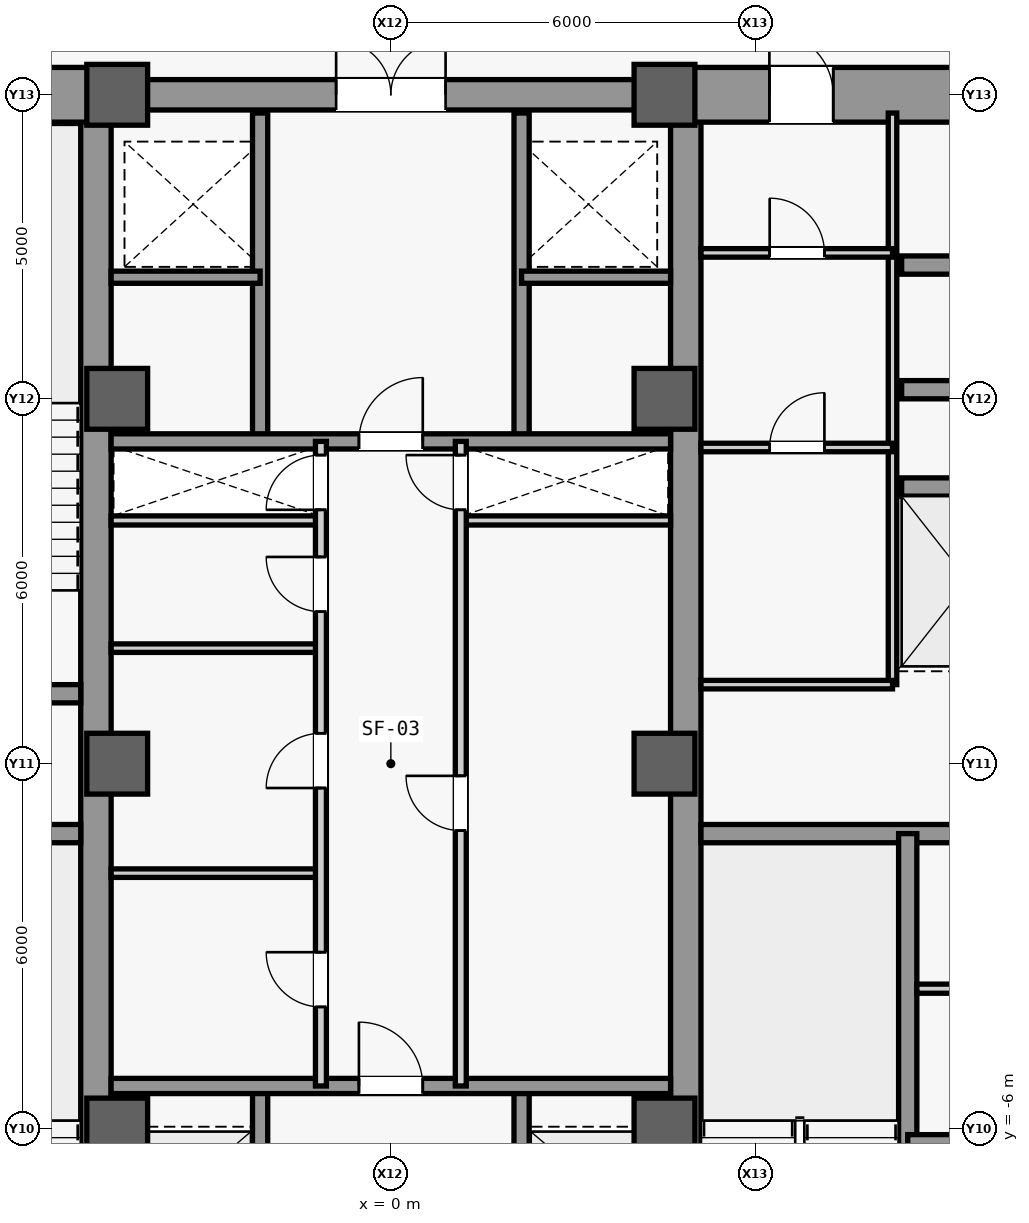
"""IFC4 building model, lengths in metres.
Left out: names, types, materials, properties, quantities, classifications, styles, units other than length and angle.
Written with IfcOpenShell. Run it as: python <this file> out.ifc"""

import sys

from ifc_helpers import new_model, si_unit, direction, frame, frame_2d, origin, origin_2d, place, context, subcontext, project, spatial, rectangle, extrude, source, transform, mapped, element, fill, save


model = new_model("IFC4")
c1 = context("Model", 3, precision=1e-05, world=origin(), true_north=direction((0.0, 1.0)))
c2 = subcontext(c1, "Body", "Model", "MODEL_VIEW")
j1 = project(units=[si_unit("LENGTHUNIT", "METRE"), si_unit("PLANEANGLEUNIT", "RADIAN")], contexts=[c1])
p1 = place(None, origin())
s1 = spatial("IfcSite", under=j1, at=p1, CompositionType="ELEMENT")
p2 = place(p1, origin())
s2 = spatial("IfcBuilding", under=s1, at=p2, CompositionType="ELEMENT")
p3 = place(p2, frame((0.0, 0.0, 83.0)))
s3 = spatial("IfcBuildingStorey", under=s2, at=p3, CompositionType="ELEMENT", Elevation=83.0)
m1 = source(origin(), c2, "Body", "SweptSolid", [
    extrude(rectangle(XDim=21.4, YDim=0.5, at=frame_2d((10.7, 0.0))), origin(), (0.0, 0.0, 1.0), 3.94),
])
for number, where, z_axis, x_axis in (
    (1, (-4.85, -10.7, 0.0), (0.0, 0.0, 1.0), (0.0, 1.0, 0.0)),
    (2, (4.85, -10.7, 0.0), (0.0, 0.0, 1.0), (0.0, 1.0, 0.0)),
):
    element("IfcWall", number, at=place(p3, frame(where, z_axis=z_axis, x_axis=x_axis)), inside=s3, PredefinedType="SHEAR", context=c2, shape_type="MappedRepresentation", body=[
        mapped(m1, transform((0.0, 0.0, 0.0), scale=1.0)),
    ])
m2 = source(origin(), c2, "Body", "SweptSolid", [
    extrude(rectangle(XDim=5.85, YDim=0.9, at=frame_2d((2.925, 0.0))), origin(), (0.0, 0.0, 1.0), 3.94),
])
p4 = place(p3, frame((-10.7, 11.0, 0.0), z_axis=(0.0, 0.0, 1.0), x_axis=(1.0, 0.0, 0.0)))
e3 = element("IfcWall", 3, at=p4, inside=s3, PredefinedType="SHEAR", context=c2, shape_type="MappedRepresentation", body=[
    mapped(m2, transform((0.0, 0.0, 0.0), scale=1.0)),
])
p5 = place(p3, frame((4.85, 11.0, 0.0), z_axis=(0.0, 0.0, 1.0), x_axis=(1.0, 0.0, 0.0)))
e4 = element("IfcWall", 4, at=p5, inside=s3, PredefinedType="SHEAR", context=c2, shape_type="MappedRepresentation", body=[
    mapped(m2, transform((0.0, 0.0, 0.0), scale=1.0)),
])
m3 = source(origin(), c2, "Body", "SweptSolid", [
    extrude(rectangle(XDim=1.05, YDim=2.2, at=frame_2d((0.525, 1.1))), frame((0.0, 0.46, 0.0), z_axis=(0.0, -1.0, 0.0), x_axis=(1.0, 0.0, 0.0)), (0.0, 0.0, 1.0), 0.92),
])
p6 = place(p5, frame((1.375, 0.0, 0.0)))
e5 = element("IfcOpeningElement", 5, at=p6, cuts=e4, PredefinedType="OPENING", context=c2, shape_type="MappedRepresentation", body=[
    mapped(m3, transform((0.0, 0.0, 0.0), scale=1.0)),
])
m4 = source(origin(), c2, "Body", "SweptSolid", [
    extrude(rectangle(XDim=5.6, YDim=0.3, at=frame_2d((2.8, 0.0))), origin(), (0.0, 0.0, 1.0), 3.94),
])
for number, where, z_axis, x_axis in (
    (6, (-10.7, -1.15, 0.0), (0.0, 0.0, 1.0), (1.0, 0.0, 0.0)),
    (7, (-10.7, 1.15, 0.0), (0.0, 0.0, 1.0), (1.0, 0.0, 0.0)),
    (8, (5.1, -1.15, 0.0), (0.0, 0.0, 1.0), (1.0, 0.0, 0.0)),
):
    element("IfcWall", number, at=place(p3, frame(where, z_axis=z_axis, x_axis=x_axis)), inside=s3, PredefinedType="SHEAR", context=c2, shape_type="MappedRepresentation", body=[
        mapped(m4, transform((0.0, 0.0, 0.0), scale=1.0)),
    ])
m5 = source(origin(), c2, "Body", "SweptSolid", [
    extrude(rectangle(XDim=9.2, YDim=0.5, at=frame_2d((4.6, 0.0))), origin(), (0.0, 0.0, 1.0), 3.94),
])
p7 = place(p3, frame((-4.6, 11.0, 0.0), z_axis=(0.0, 0.0, 1.0), x_axis=(1.0, 0.0, 0.0)))
e9 = element("IfcWall", 9, at=p7, inside=s3, PredefinedType="SHEAR", context=c2, shape_type="MappedRepresentation", body=[
    mapped(m5, transform((0.0, 0.0, 0.0), scale=1.0)),
])
m6 = source(origin(), c2, "Body", "SweptSolid", [
    extrude(rectangle(XDim=1.8, YDim=2.25, at=frame_2d((0.9, 1.125))), frame((0.0, 0.26, 0.0), z_axis=(0.0, -1.0, 0.0), x_axis=(1.0, 0.0, 0.0)), (0.0, 0.0, 1.0), 0.52),
])
p8 = place(p7, frame((3.7, 0.0, 0.0)))
e10 = element("IfcOpeningElement", 10, at=p8, cuts=e9, PredefinedType="OPENING", context=c2, shape_type="MappedRepresentation", body=[
    mapped(m6, transform((0.0, 0.0, 0.0), scale=1.0)),
])
m7 = source(origin(), c2, "Body", "SweptSolid", [
    extrude(rectangle(XDim=1.0, YDim=1.0, at=origin_2d()), origin(), (0.0, 0.0, 1.0), 4.2),
])
for number, where, z_axis, x_axis in (
    (11, (-4.5, -6.0, 0.0), (0.0, 0.0, 1.0), (1.0, 0.0, 0.0)),
    (12, (-4.5, 0.0, 0.0), (0.0, 0.0, 1.0), (1.0, 0.0, 0.0)),
    (13, (-4.5, 6.0, 0.0), (0.0, 0.0, 1.0), (1.0, 0.0, 0.0)),
    (14, (-4.5, 11.0, 0.0), (0.0, 0.0, 1.0), (1.0, 0.0, 0.0)),
    (15, (4.5, -6.0, 0.0), (0.0, 0.0, 1.0), (1.0, 0.0, 0.0)),
    (16, (4.5, 0.0, 0.0), (0.0, 0.0, 1.0), (1.0, 0.0, 0.0)),
    (17, (4.5, 6.0, 0.0), (0.0, 0.0, 1.0), (1.0, 0.0, 0.0)),
    (18, (4.5, 11.0, 0.0), (0.0, 0.0, 1.0), (1.0, 0.0, 0.0)),
):
    element("IfcColumn", number, at=place(p3, frame(where, z_axis=z_axis, x_axis=x_axis)), inside=s3, PredefinedType="COLUMN", context=c2, shape_type="MappedRepresentation", body=[
        mapped(m7, transform((0.0, 0.0, 0.0), scale=1.0)),
    ])
m8 = source(origin(), c2, "Body", "SweptSolid", [
    extrude(rectangle(XDim=7.8, YDim=0.3, at=frame_2d((3.9, 0.0))), origin(), (0.0, 0.0, 1.0), 3.94),
])
p9 = place(p3, frame((8.5, -8.95, 0.0), z_axis=(0.0, 0.0, 1.0), x_axis=(0.0, 1.0, 0.0)))
e19 = element("IfcWall", 19, at=p9, inside=s3, PredefinedType="SHEAR", context=c2, shape_type="MappedRepresentation", body=[
    mapped(m8, transform((0.0, 0.0, 0.0), scale=1.0)),
])
m9 = source(origin(), c2, "Body", "SweptSolid", [
    extrude(rectangle(XDim=2.2, YDim=0.3, at=frame_2d((1.1, 0.0))), origin(), (0.0, 0.0, 1.0), 3.94),
])
p10 = place(p3, frame((8.5, -6.25, 0.0), z_axis=(0.0, 0.0, 1.0), x_axis=(1.0, 0.0, 0.0)))
e20 = element("IfcWall", 20, at=p10, inside=s3, PredefinedType="SHEAR", context=c2, shape_type="MappedRepresentation", body=[
    mapped(m9, transform((0.0, 0.0, 0.0), scale=1.0)),
])
m10 = source(origin(), c2, "Body", "SweptSolid", [
    extrude(rectangle(XDim=2.3, YDim=0.3, at=frame_2d((1.15, 0.0))), origin(), (0.0, 0.0, 1.0), 3.94),
])
for number, where, z_axis, x_axis in (
    (21, (8.4, 4.55, 0.0), (0.0, 0.0, 1.0), (1.0, 0.0, 0.0)),
    (22, (8.4, 6.15, 0.0), (0.0, 0.0, 1.0), (1.0, 0.0, 0.0)),
    (23, (8.4, 8.2, 0.0), (0.0, 0.0, 1.0), (1.0, 0.0, 0.0)),
):
    element("IfcWall", number, at=place(p3, frame(where, z_axis=z_axis, x_axis=x_axis)), inside=s3, PredefinedType="SHEAR", context=c2, shape_type="MappedRepresentation", body=[
        mapped(m10, transform((0.0, 0.0, 0.0), scale=1.0)),
    ])
m11 = source(origin(), c2, "Body", "SweptSolid", [
    extrude(rectangle(XDim=2.05, YDim=0.15, at=frame_2d((1.025, 0.0))), origin(), (0.0, 0.0, 1.0), 3.94),
])
p11 = place(p3, frame((8.65, -3.7, 0.0), z_axis=(0.0, 0.0, 1.0), x_axis=(1.0, 0.0, 0.0)))
e24 = element("IfcWall", 24, at=p11, inside=s3, PredefinedType="PARTITIONING", context=c2, shape_type="MappedRepresentation", body=[
    mapped(m11, transform((0.0, 0.0, 0.0), scale=1.0)),
])
m12 = source(origin(), c2, "Body", "SweptSolid", [
    extrude(rectangle(XDim=9.4, YDim=0.14, at=frame_2d((4.7, 0.0))), origin(), (0.0, 0.0, 1.0), 3.94),
])
p12 = place(p3, frame((8.25, 1.3, 0.0), z_axis=(0.0, 0.0, 1.0), x_axis=(0.0, 1.0, 0.0)))
e25 = element("IfcWall", 25, at=p12, inside=s3, PredefinedType="PARTITIONING", context=c2, shape_type="MappedRepresentation", body=[
    mapped(m12, transform((0.0, 0.0, 0.0), scale=1.0)),
])
m13 = source(origin(), c2, "Body", "SweptSolid", [
    extrude(rectangle(XDim=3.15, YDim=0.14, at=frame_2d((1.575, 0.0))), origin(), (0.0, 0.0, 1.0), 3.94),
])
p13 = place(p3, frame((5.1, 1.3, 0.0), z_axis=(0.0, 0.0, 1.0), x_axis=(1.0, 0.0, 0.0)))
e26 = element("IfcWall", 26, at=p13, inside=s3, PredefinedType="PARTITIONING", context=c2, shape_type="MappedRepresentation", body=[
    mapped(m13, transform((0.0, 0.0, 0.0), scale=1.0)),
])
p14 = place(p3, frame((5.1, 8.4, 0.0), z_axis=(0.0, 0.0, 1.0), x_axis=(1.0, 0.0, 0.0)))
e27 = element("IfcWall", 27, at=p14, inside=s3, PredefinedType="PARTITIONING", context=c2, shape_type="MappedRepresentation", body=[
    mapped(m13, transform((0.0, 0.0, 0.0), scale=1.0)),
])
m14 = source(origin(), c2, "Body", "SweptSolid", [
    extrude(rectangle(XDim=0.9, YDim=2.15, at=frame_2d((0.45, 1.075))), frame((0.0, 0.08, 0.0), z_axis=(0.0, -1.0, 0.0), x_axis=(1.0, 0.0, 0.0)), (0.0, 0.0, 1.0), 0.16),
])
p15 = place(p14, frame((1.13, 0.0, 0.0)))
e28 = element("IfcOpeningElement", 28, at=p15, cuts=e27, PredefinedType="OPENING", context=c2, shape_type="MappedRepresentation", body=[
    mapped(m14, transform((0.0, 0.0, 0.0), scale=1.0)),
])
p16 = place(p3, frame((5.1, 5.2, 0.0), z_axis=(0.0, 0.0, 1.0), x_axis=(1.0, 0.0, 0.0)))
e29 = element("IfcWall", 29, at=p16, inside=s3, PredefinedType="PARTITIONING", context=c2, shape_type="MappedRepresentation", body=[
    mapped(m13, transform((0.0, 0.0, 0.0), scale=1.0)),
])
p17 = place(p16, frame((1.13, 0.0, 0.0)))
e30 = element("IfcOpeningElement", 30, at=p17, cuts=e29, PredefinedType="OPENING", context=c2, shape_type="MappedRepresentation", body=[
    mapped(m14, transform((0.0, 0.0, 0.0), scale=1.0)),
])
m15 = source(origin(), c2, "Body", "SweptSolid", [
    extrude(rectangle(XDim=3.45, YDim=0.15, at=frame_2d((1.725, 0.0))), origin(), (0.0, 0.0, 1.0), 3.94),
])
for number, where, z_axis, x_axis in (
    (31, (-4.6, 4.0, 0.0), (0.0, 0.0, 1.0), (1.0, 0.0, 0.0)),
    (32, (1.15, 4.0, 0.0), (0.0, 0.0, 1.0), (1.0, 0.0, 0.0)),
):
    element("IfcWall", number, at=place(p3, frame(where, z_axis=z_axis, x_axis=x_axis)), inside=s3, PredefinedType="PARTITIONING", context=c2, shape_type="MappedRepresentation", body=[
        mapped(m15, transform((0.0, 0.0, 0.0), scale=1.0)),
    ])
m16 = source(origin(), c2, "Body", "SweptSolid", [
    extrude(rectangle(XDim=5.4, YDim=0.25, at=frame_2d((2.7, 0.0))), origin(), (0.0, 0.0, 1.0), 3.94),
])
p18 = place(p3, frame((-2.15, -10.7, 0.0), z_axis=(0.0, 0.0, 1.0), x_axis=(0.0, 1.0, 0.0)))
e33 = element("IfcWall", 33, at=p18, inside=s3, PredefinedType="SHEAR", context=c2, shape_type="MappedRepresentation", body=[
    mapped(m16, transform((0.0, 0.0, 0.0), scale=1.0)),
])
m17 = source(origin(), c2, "Body", "SweptSolid", [
    extrude(rectangle(XDim=1.2, YDim=2.3, at=frame_2d((0.6, 1.15))), frame((0.0, 0.135, 0.0), z_axis=(0.0, -1.0, 0.0), x_axis=(1.0, 0.0, 0.0)), (0.0, 0.0, 1.0), 0.27),
])
p19 = place(p18, frame((0.9, 0.0, 0.0)))
e34 = element("IfcOpeningElement", 34, at=p19, cuts=e33, PredefinedType="OPENING", context=c2, shape_type="MappedRepresentation", body=[
    mapped(m17, transform((0.0, 0.0, 0.0), scale=1.0)),
])
p20 = place(p18, frame((3.2, 0.0, 0.0)))
e35 = element("IfcOpeningElement", 35, at=p20, cuts=e33, PredefinedType="OPENING", context=c2, shape_type="MappedRepresentation", body=[
    mapped(m17, transform((0.0, 0.0, 0.0), scale=1.0)),
])
p21 = place(p3, frame((2.15, -10.7, 0.0), z_axis=(0.0, 0.0, 1.0), x_axis=(0.0, 1.0, 0.0)))
e36 = element("IfcWall", 36, at=p21, inside=s3, PredefinedType="SHEAR", context=c2, shape_type="MappedRepresentation", body=[
    mapped(m16, transform((0.0, 0.0, 0.0), scale=1.0)),
])
p22 = place(p21, frame((0.9, 0.0, 0.0)))
e37 = element("IfcOpeningElement", 37, at=p22, cuts=e36, PredefinedType="OPENING", context=c2, shape_type="MappedRepresentation", body=[
    mapped(m17, transform((0.0, 0.0, 0.0), scale=1.0)),
])
p23 = place(p21, frame((3.2, 0.0, 0.0)))
e38 = element("IfcOpeningElement", 38, at=p23, cuts=e36, PredefinedType="OPENING", context=c2, shape_type="MappedRepresentation", body=[
    mapped(m17, transform((0.0, 0.0, 0.0), scale=1.0)),
])
m18 = source(origin(), c2, "Body", "SweptSolid", [
    extrude(rectangle(XDim=9.2, YDim=0.25, at=frame_2d((4.6, 0.0))), origin(), (0.0, 0.0, 1.0), 3.94),
])
p24 = place(p3, frame((-4.6, -5.3, 0.0), z_axis=(0.0, 0.0, 1.0), x_axis=(1.0, 0.0, 0.0)))
e39 = element("IfcWall", 39, at=p24, inside=s3, PredefinedType="SHEAR", context=c2, shape_type="MappedRepresentation", body=[
    mapped(m18, transform((0.0, 0.0, 0.0), scale=1.0)),
])
m19 = source(origin(), c2, "Body", "SweptSolid", [
    extrude(rectangle(XDim=1.05, YDim=2.2, at=frame_2d((0.525, 1.1))), frame((0.0, 0.135, 0.0), z_axis=(0.0, -1.0, 0.0), x_axis=(1.0, 0.0, 0.0)), (0.0, 0.0, 1.0), 0.27),
])
p25 = place(p24, frame((4.075, 0.0, 0.0)))
e40 = element("IfcOpeningElement", 40, at=p25, cuts=e39, PredefinedType="OPENING", context=c2, shape_type="MappedRepresentation", body=[
    mapped(m19, transform((0.0, 0.0, 0.0), scale=1.0)),
])
for number, where, z_axis, x_axis in (
    (41, (-2.15, 5.3, 0.0), (0.0, 0.0, 1.0), (0.0, 1.0, 0.0)),
    (42, (2.15, 5.3, 0.0), (0.0, 0.0, 1.0), (0.0, 1.0, 0.0)),
):
    element("IfcWall", number, at=place(p3, frame(where, z_axis=z_axis, x_axis=x_axis)), inside=s3, PredefinedType="SHEAR", context=c2, shape_type="MappedRepresentation", body=[
        mapped(m16, transform((0.0, 0.0, 0.0), scale=1.0)),
    ])
m20 = source(origin(), c2, "Body", "SweptSolid", [
    extrude(rectangle(XDim=2.45, YDim=0.2, at=frame_2d((1.225, 0.0))), origin(), (0.0, 0.0, 1.0), 3.94),
])
for number, where, z_axis, x_axis in (
    (43, (-4.6, 8.0, 0.0), (0.0, 0.0, 1.0), (1.0, 0.0, 0.0)),
    (44, (2.15, 8.0, 0.0), (0.0, 0.0, 1.0), (1.0, 0.0, 0.0)),
):
    element("IfcWall", number, at=place(p3, frame(where, z_axis=z_axis, x_axis=x_axis)), inside=s3, PredefinedType="SHEAR", context=c2, shape_type="MappedRepresentation", body=[
        mapped(m20, transform((0.0, 0.0, 0.0), scale=1.0)),
    ])
p26 = place(p3, frame((-4.6, 5.3, 0.0), z_axis=(0.0, 0.0, 1.0), x_axis=(1.0, 0.0, 0.0)))
e45 = element("IfcWall", 45, at=p26, inside=s3, PredefinedType="SHEAR", context=c2, shape_type="MappedRepresentation", body=[
    mapped(m18, transform((0.0, 0.0, 0.0), scale=1.0)),
])
p27 = place(p26, frame((4.075, 0.0, 0.0)))
e46 = element("IfcOpeningElement", 46, at=p27, cuts=e45, PredefinedType="OPENING", context=c2, shape_type="MappedRepresentation", body=[
    mapped(m19, transform((0.0, 0.0, 0.0), scale=1.0)),
])
m21 = source(origin(), c2, "Body", "SweptSolid", [
    extrude(rectangle(XDim=3.45, YDim=0.14, at=frame_2d((1.725, 0.0))), origin(), (0.0, 0.0, 1.0), 3.94),
])
for number, where, z_axis, x_axis in (
    (47, (-4.6, -1.8, 0.0), (0.0, 0.0, 1.0), (1.0, 0.0, 0.0)),
    (48, (-4.6, 1.9, 0.0), (0.0, 0.0, 1.0), (1.0, 0.0, 0.0)),
):
    element("IfcWall", number, at=place(p3, frame(where, z_axis=z_axis, x_axis=x_axis)), inside=s3, PredefinedType="PARTITIONING", context=c2, shape_type="MappedRepresentation", body=[
        mapped(m21, transform((0.0, 0.0, 0.0), scale=1.0)),
    ])
m22 = source(origin(), c2, "Body", "SweptSolid", [
    extrude(rectangle(XDim=10.6, YDim=0.18, at=frame_2d((5.3, 0.0))), origin(), (0.0, 0.0, 1.0), 3.94),
])
p28 = place(p3, frame((-1.15, -5.3, 0.0), z_axis=(0.0, 0.0, 1.0), x_axis=(0.0, 1.0, 0.0)))
e49 = element("IfcWall", 49, at=p28, inside=s3, PredefinedType="PARTITIONING", context=c2, shape_type="MappedRepresentation", body=[
    mapped(m22, transform((0.0, 0.0, 0.0), scale=1.0)),
])
m23 = source(origin(), c2, "Body", "SweptSolid", [
    extrude(rectangle(XDim=0.9, YDim=2.15, at=frame_2d((0.45, 1.075))), frame((0.0, 0.1, 0.0), z_axis=(0.0, -1.0, 0.0), x_axis=(1.0, 0.0, 0.0)), (0.0, 0.0, 1.0), 0.2),
])
p29 = place(p28, frame((1.3, 0.0, 0.0)))
e50 = element("IfcOpeningElement", 50, at=p29, cuts=e49, PredefinedType="OPENING", context=c2, shape_type="MappedRepresentation", body=[
    mapped(m23, transform((0.0, 0.0, 0.0), scale=1.0)),
])
p30 = place(p28, frame((4.9, 0.0, 0.0)))
e51 = element("IfcOpeningElement", 51, at=p30, cuts=e49, PredefinedType="OPENING", context=c2, shape_type="MappedRepresentation", body=[
    mapped(m23, transform((0.0, 0.0, 0.0), scale=1.0)),
])
p31 = place(p28, frame((7.8, 0.0, 0.0)))
e52 = element("IfcOpeningElement", 52, at=p31, cuts=e49, PredefinedType="OPENING", context=c2, shape_type="MappedRepresentation", body=[
    mapped(m23, transform((0.0, 0.0, 0.0), scale=1.0)),
])
p32 = place(p28, frame((9.475, 0.0, 0.0)))
e53 = element("IfcOpeningElement", 53, at=p32, cuts=e49, PredefinedType="OPENING", context=c2, shape_type="MappedRepresentation", body=[
    mapped(m23, transform((0.0, 0.0, 0.0), scale=1.0)),
])
p33 = place(p3, frame((1.15, -5.3, 0.0), z_axis=(0.0, 0.0, 1.0), x_axis=(0.0, 1.0, 0.0)))
e54 = element("IfcWall", 54, at=p33, inside=s3, PredefinedType="PARTITIONING", context=c2, shape_type="MappedRepresentation", body=[
    mapped(m22, transform((0.0, 0.0, 0.0), scale=1.0)),
])
p34 = place(p33, frame((4.2, 0.0, 0.0)))
e55 = element("IfcOpeningElement", 55, at=p34, cuts=e54, PredefinedType="OPENING", context=c2, shape_type="MappedRepresentation", body=[
    mapped(m23, transform((0.0, 0.0, 0.0), scale=1.0)),
])
p35 = place(p33, frame((9.475, 0.0, 0.0)))
e56 = element("IfcOpeningElement", 56, at=p35, cuts=e54, PredefinedType="OPENING", context=c2, shape_type="MappedRepresentation", body=[
    mapped(m23, transform((0.0, 0.0, 0.0), scale=1.0)),
])
m24 = source(origin(), c2, "Body", "SweptSolid", [
    extrude(rectangle(XDim=1.05, YDim=2.2, at=frame_2d((0.525, 1.1))), frame((0.0, 0.025, 0.0), z_axis=(0.0, -1.0, 0.0), x_axis=(1.0, 0.0, 0.0)), (0.0, 0.0, 1.0), 0.05),
])
p36 = place(p6, origin())
e57 = element("IfcDoor", 57, at=p36, inside=s3, OperationType="SINGLE_SWING_LEFT", PredefinedType="DOOR", context=c2, shape_type="MappedRepresentation", body=[
    mapped(m24, transform((0.0, 0.0, 0.0), scale=1.0)),
])
fill(e5, e57)
m25 = source(origin(), c2, "Body", "SweptSolid", [
    extrude(rectangle(XDim=0.9, YDim=2.15, at=frame_2d((0.45, 1.075))), frame((0.0, 0.025, 0.0), z_axis=(0.0, -1.0, 0.0), x_axis=(1.0, 0.0, 0.0)), (0.0, 0.0, 1.0), 0.05),
])
p37 = place(p15, origin())
e58 = element("IfcDoor", 58, at=p37, inside=s3, OperationType="SINGLE_SWING_LEFT", PredefinedType="DOOR", context=c2, shape_type="MappedRepresentation", body=[
    mapped(m25, transform((0.0, 0.0, 0.0), scale=1.0)),
])
fill(e28, e58)
p38 = place(p17, origin())
e59 = element("IfcDoor", 59, at=p38, inside=s3, OperationType="SINGLE_SWING_RIGHT", PredefinedType="DOOR", context=c2, shape_type="MappedRepresentation", body=[
    mapped(m25, transform((0.0, 0.0, 0.0), scale=1.0)),
])
fill(e30, e59)
p39 = place(p25, origin())
e60 = element("IfcDoor", 60, at=p39, inside=s3, OperationType="SINGLE_SWING_LEFT", PredefinedType="DOOR", context=c2, shape_type="MappedRepresentation", body=[
    mapped(m24, transform((0.0, 0.0, 0.0), scale=1.0)),
])
fill(e40, e60)
p40 = place(p27, origin())
e61 = element("IfcDoor", 61, at=p40, inside=s3, OperationType="SINGLE_SWING_RIGHT", PredefinedType="DOOR", context=c2, shape_type="MappedRepresentation", body=[
    mapped(m24, transform((0.0, 0.0, 0.0), scale=1.0)),
])
fill(e46, e61)
m26 = source(origin(), c2, "Body", "SweptSolid", [
    extrude(rectangle(XDim=1.8, YDim=2.25, at=frame_2d((0.9, 1.125))), frame((0.0, 0.025, 0.0), z_axis=(0.0, -1.0, 0.0), x_axis=(1.0, 0.0, 0.0)), (0.0, 0.0, 1.0), 0.05),
])
p41 = place(p8, origin())
e62 = element("IfcDoor", 62, at=p41, inside=s3, OperationType="SINGLE_SWING_RIGHT", PredefinedType="DOOR", context=c2, shape_type="MappedRepresentation", body=[
    mapped(m26, transform((0.0, 0.0, 0.0), scale=1.0)),
])
fill(e10, e62)
p42 = place(p29, origin())
e63 = element("IfcDoor", 63, at=p42, inside=s3, OperationType="SINGLE_SWING_RIGHT", PredefinedType="DOOR", context=c2, shape_type="MappedRepresentation", body=[
    mapped(m25, transform((0.0, 0.0, 0.0), scale=1.0)),
])
fill(e50, e63)
p43 = place(p30, origin())
e64 = element("IfcDoor", 64, at=p43, inside=s3, OperationType="SINGLE_SWING_LEFT", PredefinedType="DOOR", context=c2, shape_type="MappedRepresentation", body=[
    mapped(m25, transform((0.0, 0.0, 0.0), scale=1.0)),
])
fill(e51, e64)
p44 = place(p31, origin())
e65 = element("IfcDoor", 65, at=p44, inside=s3, OperationType="SINGLE_SWING_RIGHT", PredefinedType="DOOR", context=c2, shape_type="MappedRepresentation", body=[
    mapped(m25, transform((0.0, 0.0, 0.0), scale=1.0)),
])
fill(e52, e65)
p45 = place(p34, origin())
e66 = element("IfcDoor", 66, at=p45, inside=s3, OperationType="SINGLE_SWING_RIGHT", PredefinedType="DOOR", context=c2, shape_type="MappedRepresentation", body=[
    mapped(m25, transform((0.0, 0.0, 0.0), scale=1.0)),
])
fill(e55, e66)
p46 = place(p32, origin())
e67 = element("IfcDoor", 67, at=p46, inside=s3, OperationType="SINGLE_SWING_LEFT", PredefinedType="DOOR", context=c2, shape_type="MappedRepresentation", body=[
    mapped(m25, transform((0.0, 0.0, 0.0), scale=1.0)),
])
fill(e53, e67)
p47 = place(p35, origin())
e68 = element("IfcDoor", 68, at=p47, inside=s3, OperationType="SINGLE_SWING_RIGHT", PredefinedType="DOOR", context=c2, shape_type="MappedRepresentation", body=[
    mapped(m25, transform((0.0, 0.0, 0.0), scale=1.0)),
])
fill(e56, e68)
save(model, sys.argv[1])
